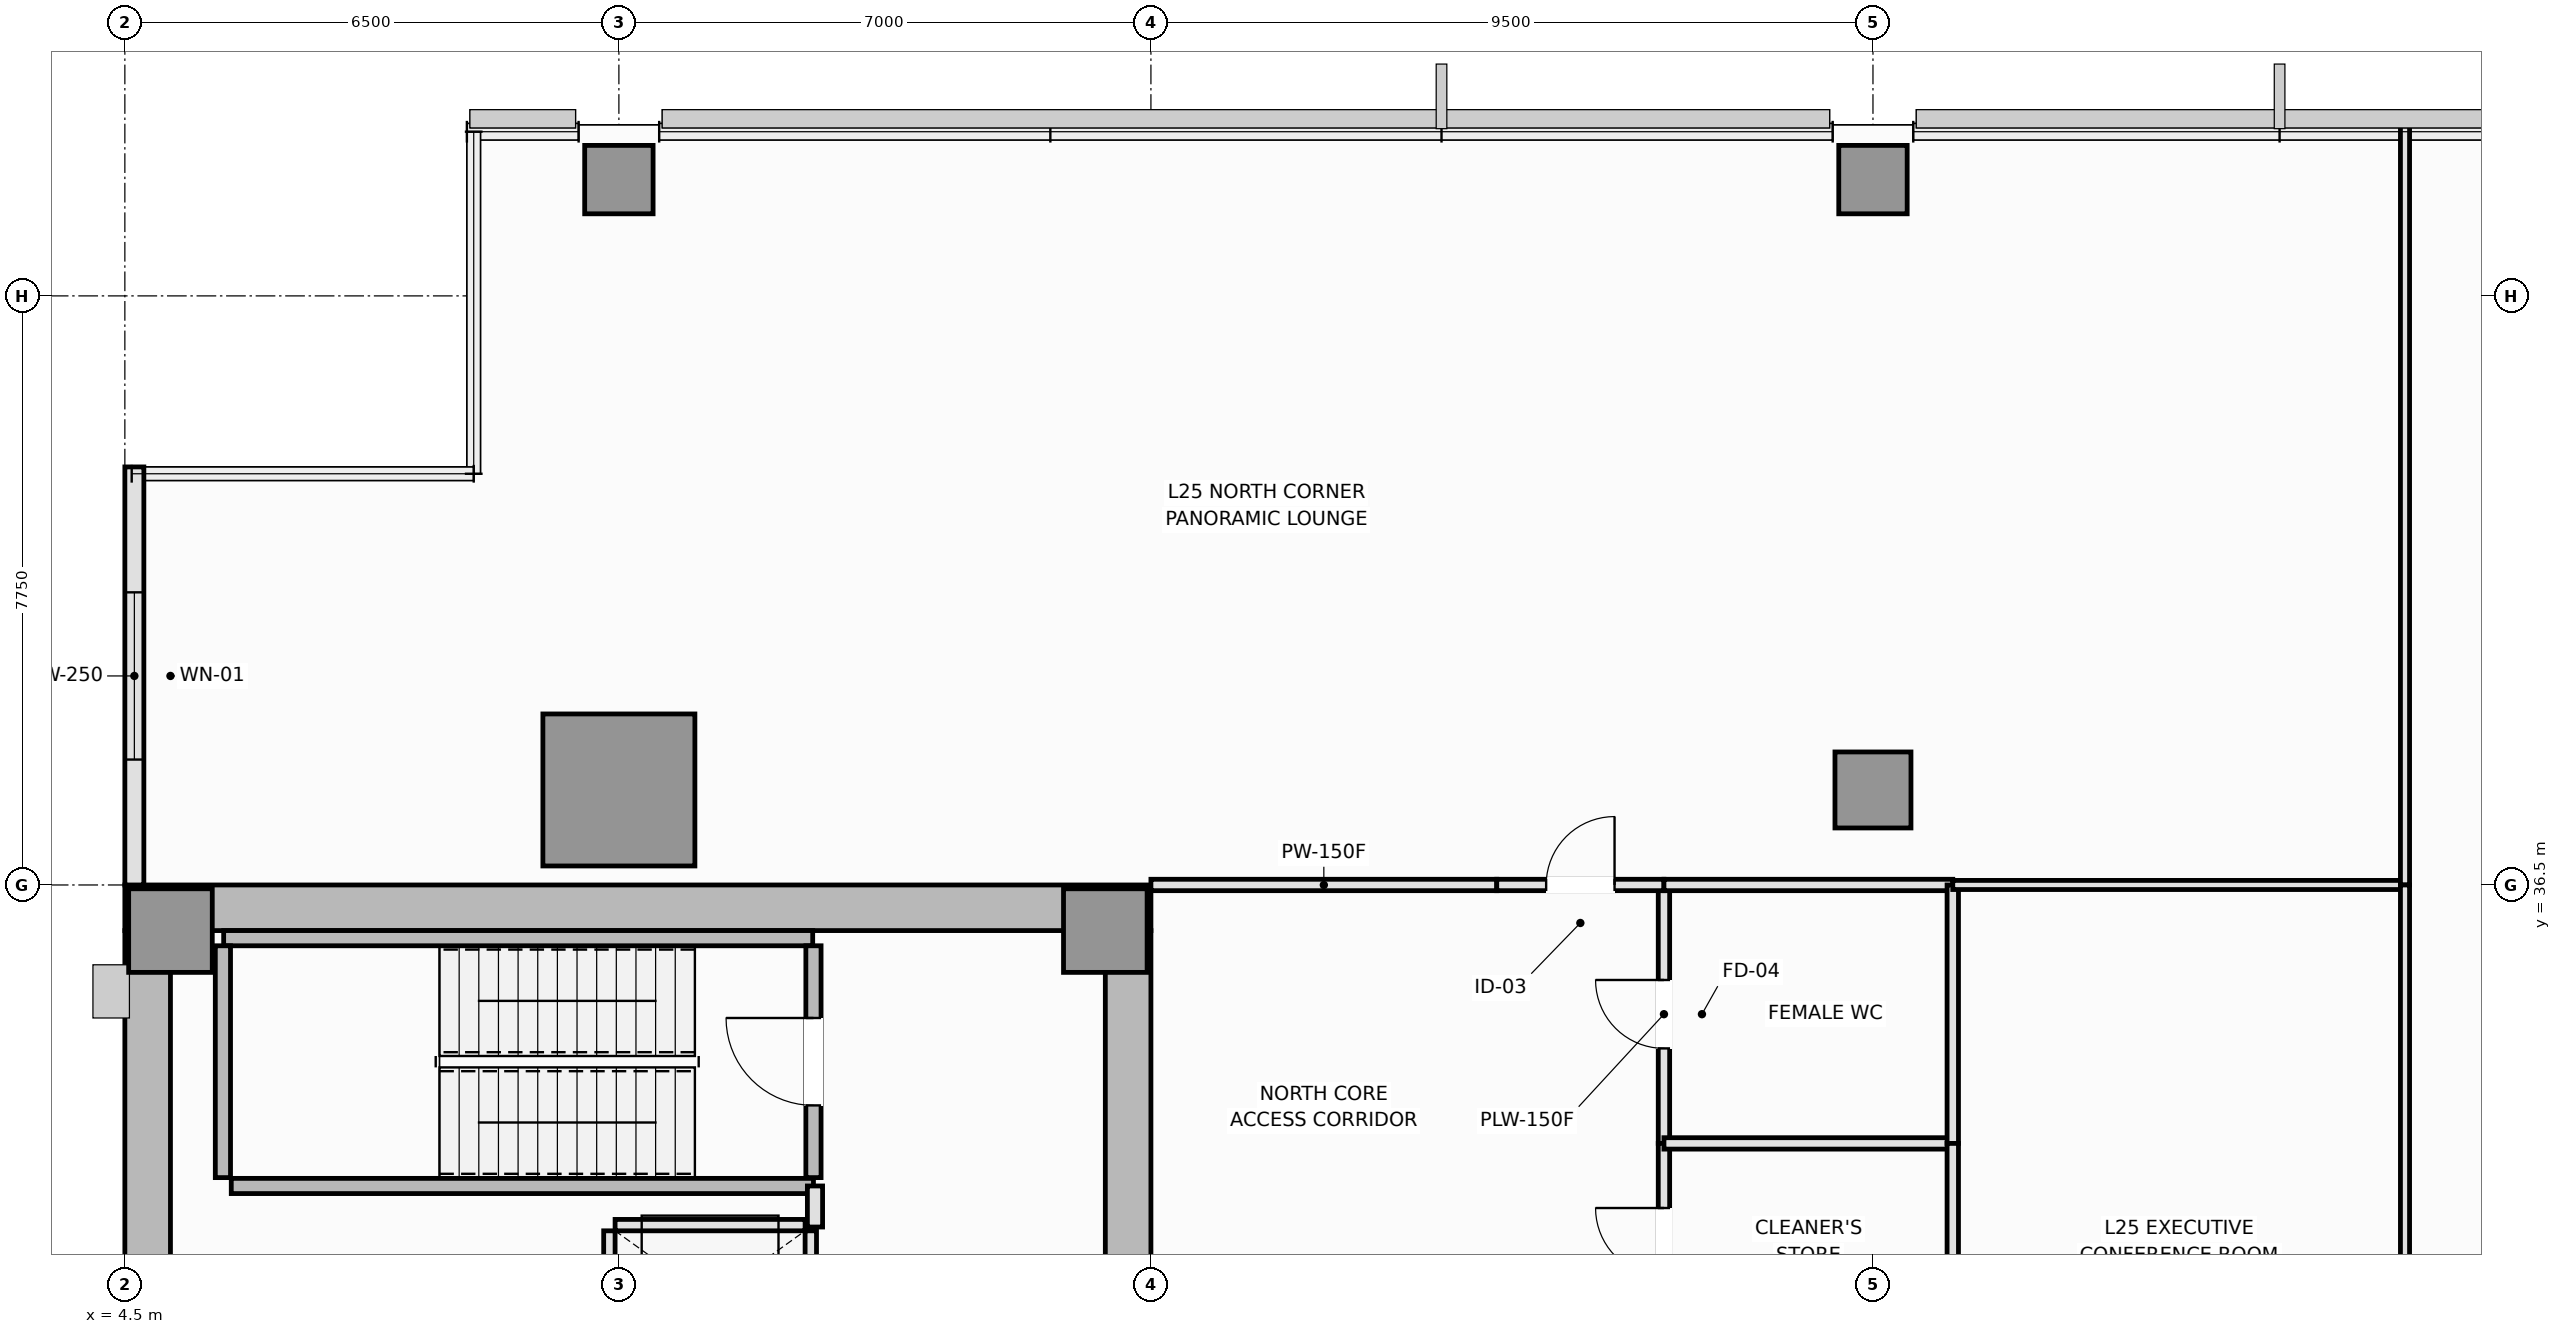
"""IFC4 building model, lengths in metres.
Left out: names, types, materials, properties, quantities, classifications, styles, units other than length and angle.
Written with IfcOpenShell. Run it as: python <this file> out.ifc"""

import sys

from ifc_helpers import new_model, si_unit, direction, frame, frame_2d, origin, origin_2d, place, context, subcontext, project, spatial, rectangle, extrude, element, fill, save


model = new_model("IFC4")
c1 = context("Model", 3, precision=1e-05, world=origin(), true_north=direction((0.0, 1.0)))
c2 = subcontext(c1, "Body", "Model", "MODEL_VIEW")
j1 = project(units=[si_unit("LENGTHUNIT", "METRE"), si_unit("PLANEANGLEUNIT", "RADIAN")], contexts=[c1])
p1 = place(None, origin())
s1 = spatial("IfcSite", under=j1, at=p1, CompositionType="ELEMENT")
p2 = place(p1, origin())
s2 = spatial("IfcBuilding", under=s1, at=p2, CompositionType="ELEMENT")
p3 = place(p2, frame((0.0, 0.0, 97.85)))
s3 = spatial("IfcBuildingStorey", under=s2, at=p3, CompositionType="ELEMENT", Elevation=97.85)
p4 = place(p3, frame((4.5, 36.2, 0.0), z_axis=(0.0, 0.0, 1.0), x_axis=(1.0, 0.0, 0.0)))
e1 = element("IfcWall", 1, at=p4, inside=s3, PredefinedType="SHEAR", context=c2, shape_type="SweptSolid", body=[
    extrude(rectangle(XDim=13.5, YDim=0.6, at=frame_2d((6.75, 0.0))), origin(), (0.0, 0.0, 1.0), 4.4),
])
p5 = place(p3, frame((4.8, 14.6, 0.0), z_axis=(0.0, 0.0, 1.0), x_axis=(0.0, 1.0, 0.0)))
e2 = element("IfcWall", 2, at=p5, inside=s3, PredefinedType="SHEAR", context=c2, shape_type="SweptSolid", body=[
    extrude(rectangle(XDim=21.3, YDim=0.6, at=frame_2d((10.65, 0.0))), origin(), (0.0, 0.0, 1.0), 4.4),
])
p6 = place(p3, frame((17.7, 27.05, 0.0), z_axis=(0.0, 0.0, 1.0), x_axis=(0.0, 1.0, 0.0)))
e3 = element("IfcWall", 3, at=p6, inside=s3, PredefinedType="SHEAR", context=c2, shape_type="SweptSolid", body=[
    extrude(rectangle(XDim=8.85, YDim=0.6, at=frame_2d((4.425, 0.0))), origin(), (0.0, 0.0, 1.0), 4.4),
])
p7 = place(p6, frame((3.45, 0.0, 0.0)))
e4 = element("IfcOpeningElement", 4, at=p7, cuts=e3, PredefinedType="OPENING", context=c2, shape_type="SweptSolid", body=[
    extrude(rectangle(XDim=1.1, YDim=2.15, at=frame_2d((0.55, 1.075))), frame((0.0, 0.31, 0.0), z_axis=(0.0, -1.0, 0.0), x_axis=(1.0, 0.0, 0.0)), (0.0, 0.0, 1.0), 0.62),
])
for number, where, z_axis, x_axis in (
    (5, (5.1, 35.9, 0.0), (0.0, 0.0, 1.0), (1.0, 0.0, 0.0)),
    (6, (17.4, 35.9, 0.0), (0.0, 0.0, 1.0), (1.0, 0.0, 0.0)),
):
    element("IfcColumn", number, at=place(p3, frame(where, z_axis=z_axis, x_axis=x_axis)), inside=s3, PredefinedType="PILASTER", context=c2, shape_type="SweptSolid", body=[
        extrude(rectangle(XDim=1.1, YDim=1.1, at=origin_2d()), origin(), (0.0, 0.0, 1.0), 4.4),
    ])
p8 = place(p3, frame((11.0, 37.75, 0.0), z_axis=(0.0, 0.0, 1.0), x_axis=(1.0, 0.0, 0.0)))
e7 = element("IfcColumn", 7, at=p8, inside=s3, PredefinedType="COLUMN", context=c2, shape_type="SweptSolid", body=[
    extrude(rectangle(XDim=2.0, YDim=2.0, at=origin_2d()), origin(), (0.0, 0.0, 1.0), 4.4),
])
p9 = place(p3, frame((27.5, 37.75, 0.0), z_axis=(0.0, 0.0, 1.0), x_axis=(1.0, 0.0, 0.0)))
e8 = element("IfcColumn", 8, at=p9, inside=s3, PredefinedType="COLUMN", context=c2, shape_type="SweptSolid", body=[
    extrude(rectangle(XDim=1.0, YDim=1.0, at=origin_2d()), origin(), (0.0, 0.0, 1.0), 4.4),
])
for number, where, z_axis, x_axis in (
    (9, (11.0, 45.78, 0.0), (0.0, 0.0, 1.0), (1.0, 0.0, 0.0)),
    (10, (27.5, 45.78, 0.0), (0.0, 0.0, 1.0), (1.0, 0.0, 0.0)),
):
    element("IfcColumn", number, at=place(p3, frame(where, z_axis=z_axis, x_axis=x_axis)), inside=s3, PredefinedType="COLUMN", context=c2, shape_type="SweptSolid", body=[
        extrude(rectangle(XDim=0.9, YDim=0.9, at=origin_2d()), origin(), (0.0, 0.0, 1.0), 4.4),
    ])
p10 = place(p3, frame((4.625, 42.0, 0.0), z_axis=(0.0, 0.0, 1.0), x_axis=(0.0, -1.0, 0.0)))
e11 = element("IfcWall", 11, at=p10, inside=s3, PredefinedType="SOLIDWALL", context=c2, shape_type="SweptSolid", body=[
    extrude(rectangle(XDim=5.5, YDim=0.25, at=frame_2d((2.75, 0.0))), origin(), (0.0, 0.0, 1.0), 4.22),
])
p11 = place(p10, frame((1.65, 0.0, 0.9)))
e12 = element("IfcOpeningElement", 12, at=p11, cuts=e11, PredefinedType="OPENING", context=c2, shape_type="SweptSolid", body=[
    extrude(rectangle(XDim=2.2, YDim=1.8, at=frame_2d((1.1, 0.9))), frame((0.0, 0.135, 0.0), z_axis=(0.0, -1.0, 0.0), x_axis=(1.0, 0.0, 0.0)), (0.0, 0.0, 1.0), 0.27),
])
p12 = place(p3, frame((5.8, 35.8, 0.0), z_axis=(0.0, 0.0, 1.0), x_axis=(1.0, 0.0, 0.0)))
e13 = element("IfcWall", 13, at=p12, inside=s3, PredefinedType="SOLIDWALL", context=c2, shape_type="SweptSolid", body=[
    extrude(rectangle(XDim=7.75, YDim=0.2, at=frame_2d((3.875, 0.0))), origin(), (0.0, 0.0, 1.0), 4.4),
])
p13 = place(p3, frame((5.79, 32.65, 0.0), z_axis=(0.0, 0.0, 1.0), x_axis=(0.0, 1.0, 0.0)))
e14 = element("IfcWall", 14, at=p13, inside=s3, PredefinedType="SOLIDWALL", context=c2, shape_type="SweptSolid", body=[
    extrude(rectangle(XDim=3.05, YDim=0.2, at=frame_2d((1.525, 0.0))), origin(), (0.0, 0.0, 1.0), 4.4),
])
p14 = place(p3, frame((5.9, 32.54, 0.0), z_axis=(0.0, 0.0, 1.0), x_axis=(1.0, 0.0, 0.0)))
e15 = element("IfcWall", 15, at=p14, inside=s3, PredefinedType="SOLIDWALL", context=c2, shape_type="SweptSolid", body=[
    extrude(rectangle(XDim=7.66, YDim=0.2, at=frame_2d((3.83, 0.0))), origin(), (0.0, 0.0, 1.0), 4.4),
])
p15 = place(p3, frame((13.56, 32.65, 0.0), z_axis=(0.0, 0.0, 1.0), x_axis=(0.0, 1.0, 0.0)))
e16 = element("IfcWall", 16, at=p15, inside=s3, PredefinedType="SOLIDWALL", context=c2, shape_type="SweptSolid", body=[
    extrude(rectangle(XDim=3.05, YDim=0.2, at=frame_2d((1.525, 0.0))), origin(), (0.0, 0.0, 1.0), 4.4),
])
p16 = place(p15, frame((0.95, 0.0, 0.0)))
e17 = element("IfcOpeningElement", 17, at=p16, cuts=e16, PredefinedType="OPENING", context=c2, shape_type="SweptSolid", body=[
    extrude(rectangle(XDim=1.15, YDim=2.15, at=frame_2d((0.575, 1.075))), frame((0.0, 0.11, 0.0), z_axis=(0.0, -1.0, 0.0), x_axis=(1.0, 0.0, 0.0)), (0.0, 0.0, 1.0), 0.22),
])
p17 = place(p3, frame((10.95, 32.025, 0.0), z_axis=(0.0, 0.0, 1.0), x_axis=(1.0, 0.0, 0.0)))
e18 = element("IfcWall", 18, at=p17, inside=s3, PredefinedType="PARTITIONING", context=c2, shape_type="SweptSolid", body=[
    extrude(rectangle(XDim=2.5, YDim=0.15, at=frame_2d((1.25, 0.0))), origin(), (0.0, 0.0, 1.0), 4.22),
])
p18 = place(p3, frame((10.875, 30.15, 0.0), z_axis=(0.0, 0.0, 1.0), x_axis=(0.0, 1.0, 0.0)))
e19 = element("IfcWall", 19, at=p18, inside=s3, PredefinedType="PARTITIONING", context=c2, shape_type="SweptSolid", body=[
    extrude(rectangle(XDim=1.8, YDim=0.15, at=frame_2d((0.9, 0.0))), origin(), (0.0, 0.0, 1.0), 4.22),
])
p19 = place(p3, frame((13.525, 30.15, 0.0), z_axis=(0.0, 0.0, 1.0), x_axis=(0.0, 1.0, 0.0)))
e20 = element("IfcWall", 20, at=p19, inside=s3, PredefinedType="PARTITIONING", context=c2, shape_type="SweptSolid", body=[
    extrude(rectangle(XDim=1.8, YDim=0.15, at=frame_2d((0.9, 0.0))), origin(), (0.0, 0.0, 1.0), 4.22),
])
p20 = place(p19, frame((0.35, 0.0, 0.0)))
e21 = element("IfcOpeningElement", 21, at=p20, cuts=e20, PredefinedType="OPENING", context=c2, shape_type="SweptSolid", body=[
    extrude(rectangle(XDim=1.1, YDim=2.2, at=frame_2d((0.55, 1.1))), frame((0.0, 0.085, 0.0), z_axis=(0.0, -1.0, 0.0), x_axis=(1.0, 0.0, 0.0)), (0.0, 0.0, 1.0), 0.17),
])
p21 = place(p3, frame((13.58, 32.0, 0.0), z_axis=(0.0, 0.0, 1.0), x_axis=(0.0, 1.0, 0.0)))
e22 = element("IfcWall", 22, at=p21, inside=s3, PredefinedType="PARTITIONING", context=c2, shape_type="SweptSolid", body=[
    extrude(rectangle(XDim=0.54, YDim=0.2, at=frame_2d((0.27, 0.0))), origin(), (0.0, 0.0, 1.0), 4.22),
])
p22 = place(p3, frame((18.0, 36.5, 0.0), z_axis=(0.0, 0.0, 1.0), x_axis=(1.0, 0.0, 0.0)))
e23 = element("IfcWall", 23, at=p22, inside=s3, PredefinedType="PARTITIONING", context=c2, shape_type="SweptSolid", body=[
    extrude(rectangle(XDim=4.55, YDim=0.15, at=frame_2d((2.275, 0.0))), origin(), (0.0, 0.0, 1.0), 4.22),
])
p23 = place(p3, frame((24.75, 33.1, 0.0), z_axis=(0.0, 0.0, 1.0), x_axis=(0.0, 1.0, 0.0)))
e24 = element("IfcWall", 24, at=p23, inside=s3, PredefinedType="PLUMBINGWALL", context=c2, shape_type="SweptSolid", body=[
    extrude(rectangle(XDim=3.4, YDim=0.15, at=frame_2d((1.7, 0.0))), origin(), (0.0, 0.0, 1.0), 4.22),
])
p24 = place(p23, frame((1.25, 0.0, 0.0)))
e25 = element("IfcOpeningElement", 25, at=p24, cuts=e24, PredefinedType="OPENING", context=c2, shape_type="SweptSolid", body=[
    extrude(rectangle(XDim=0.9, YDim=2.1, at=frame_2d((0.45, 1.05))), frame((0.0, 0.085, 0.0), z_axis=(0.0, -1.0, 0.0), x_axis=(1.0, 0.0, 0.0)), (0.0, 0.0, 1.0), 0.17),
])
p25 = place(p3, frame((24.75, 30.5, 0.0), z_axis=(0.0, 0.0, 1.0), x_axis=(0.0, 1.0, 0.0)))
e26 = element("IfcWall", 26, at=p25, inside=s3, PredefinedType="PLUMBINGWALL", context=c2, shape_type="SweptSolid", body=[
    extrude(rectangle(XDim=2.6, YDim=0.15, at=frame_2d((1.3, 0.0))), origin(), (0.0, 0.0, 1.0), 4.22),
])
p26 = place(p25, frame((0.85, 0.0, 0.0)))
e27 = element("IfcOpeningElement", 27, at=p26, cuts=e26, PredefinedType="OPENING", context=c2, shape_type="SweptSolid", body=[
    extrude(rectangle(XDim=0.9, YDim=2.1, at=frame_2d((0.45, 1.05))), frame((0.0, 0.085, 0.0), z_axis=(0.0, -1.0, 0.0), x_axis=(1.0, 0.0, 0.0)), (0.0, 0.0, 1.0), 0.17),
])
p27 = place(p3, frame((22.55, 36.5, 0.0), z_axis=(0.0, 0.0, 1.0), x_axis=(1.0, 0.0, 0.0)))
e28 = element("IfcWall", 28, at=p27, inside=s3, PredefinedType="PARTITIONING", context=c2, shape_type="SweptSolid", body=[
    extrude(rectangle(XDim=2.2, YDim=0.15, at=frame_2d((1.1, 0.0))), origin(), (0.0, 0.0, 1.0), 4.22),
])
p28 = place(p27, frame((0.65, 0.0, 0.0)))
e29 = element("IfcOpeningElement", 29, at=p28, cuts=e28, PredefinedType="OPENING", context=c2, shape_type="SweptSolid", body=[
    extrude(rectangle(XDim=0.9, YDim=2.1, at=frame_2d((0.45, 1.05))), frame((0.0, 0.085, 0.0), z_axis=(0.0, -1.0, 0.0), x_axis=(1.0, 0.0, 0.0)), (0.0, 0.0, 1.0), 0.17),
])
for number, where, z_axis, x_axis in (
    (30, (24.75, 33.1, 0.0), (0.0, 0.0, 1.0), (1.0, 0.0, 0.0)),
    (31, (24.75, 36.5, 0.0), (0.0, 0.0, 1.0), (1.0, 0.0, 0.0)),
):
    element("IfcWall", number, at=place(p3, frame(where, z_axis=z_axis, x_axis=x_axis)), inside=s3, PredefinedType="PLUMBINGWALL", context=c2, shape_type="SweptSolid", body=[
        extrude(rectangle(XDim=3.8, YDim=0.15, at=frame_2d((1.9, 0.0))), origin(), (0.0, 0.0, 1.0), 4.22),
    ])
p29 = place(p3, frame((28.55, 33.1, 0.0), z_axis=(0.0, 0.0, 1.0), x_axis=(0.0, 1.0, 0.0)))
e32 = element("IfcWall", 32, at=p29, inside=s3, PredefinedType="PLUMBINGWALL", context=c2, shape_type="SweptSolid", body=[
    extrude(rectangle(XDim=3.4, YDim=0.15, at=frame_2d((1.7, 0.0))), origin(), (0.0, 0.0, 1.0), 4.22),
])
p30 = place(p3, frame((28.55, 30.5, 0.0), z_axis=(0.0, 0.0, 1.0), x_axis=(0.0, 1.0, 0.0)))
e33 = element("IfcWall", 33, at=p30, inside=s3, PredefinedType="PLUMBINGWALL", context=c2, shape_type="SweptSolid", body=[
    extrude(rectangle(XDim=2.6, YDim=0.15, at=frame_2d((1.3, 0.0))), origin(), (0.0, 0.0, 1.0), 4.22),
])
p31 = place(p3, frame((28.55, 36.5, 0.0), z_axis=(0.0, 0.0, 1.0), x_axis=(1.0, 0.0, 0.0)))
e34 = element("IfcWall", 34, at=p31, inside=s3, PredefinedType="PARTITIONING", context=c2, shape_type="SweptSolid", body=[
    extrude(rectangle(XDim=5.95, YDim=0.12, at=frame_2d((2.975, 0.0))), origin(), (0.0, 0.0, 1.0), 4.22),
])
p32 = place(p3, frame((34.5, 36.5, 0.0), z_axis=(0.0, 0.0, 1.0), x_axis=(0.0, 1.0, 0.0)))
e35 = element("IfcWall", 35, at=p32, inside=s3, PredefinedType="PARTITIONING", context=c2, shape_type="SweptSolid", body=[
    extrude(rectangle(XDim=9.99, YDim=0.12, at=frame_2d((4.995, 0.0))), origin(), (0.0, 0.0, 1.0), 3.82),
])
p33 = place(p3, frame((34.5, 26.7, 0.0), z_axis=(0.0, 0.0, 1.0), x_axis=(0.0, 1.0, 0.0)))
e36 = element("IfcWall", 36, at=p33, inside=s3, PredefinedType="PARTITIONING", context=c2, shape_type="SweptSolid", body=[
    extrude(rectangle(XDim=9.8, YDim=0.12, at=frame_2d((4.9, 0.0))), origin(), (0.0, 0.0, 1.0), 4.22),
])
p34 = place(p11, origin())
e37 = element("IfcWindow", 37, at=p34, inside=s3, PartitioningType="SINGLE_PANEL", PredefinedType="WINDOW", context=c2, shape_type="SweptSolid", body=[
    extrude(rectangle(XDim=2.2, YDim=1.8, at=frame_2d((1.1, 0.9))), frame((0.0, 0.03, 0.0), z_axis=(0.0, -1.0, 0.0), x_axis=(1.0, 0.0, 0.0)), (0.0, 0.0, 1.0), 0.06),
])
fill(e12, e37)
p35 = place(p16, origin())
e38 = element("IfcDoor", 38, at=p35, inside=s3, OperationType="SINGLE_SWING_RIGHT", PredefinedType="DOOR", context=c2, shape_type="SweptSolid", body=[
    extrude(rectangle(XDim=1.15, YDim=2.15, at=frame_2d((0.575, 1.075))), frame((0.0, 0.025, 0.0), z_axis=(0.0, -1.0, 0.0), x_axis=(1.0, 0.0, 0.0)), (0.0, 0.0, 1.0), 0.05),
])
fill(e17, e38)
p36 = place(p24, origin())
e39 = element("IfcDoor", 39, at=p36, inside=s3, OperationType="SINGLE_SWING_RIGHT", PredefinedType="DOOR", context=c2, shape_type="SweptSolid", body=[
    extrude(rectangle(XDim=0.9, YDim=2.1, at=frame_2d((0.45, 1.05))), frame((0.0, 0.025, 0.0), z_axis=(0.0, -1.0, 0.0), x_axis=(1.0, 0.0, 0.0)), (0.0, 0.0, 1.0), 0.05),
])
fill(e25, e39)
p37 = place(p26, origin())
e40 = element("IfcDoor", 40, at=p37, inside=s3, OperationType="SINGLE_SWING_RIGHT", PredefinedType="DOOR", context=c2, shape_type="SweptSolid", body=[
    extrude(rectangle(XDim=0.9, YDim=2.1, at=frame_2d((0.45, 1.05))), frame((0.0, 0.025, 0.0), z_axis=(0.0, -1.0, 0.0), x_axis=(1.0, 0.0, 0.0)), (0.0, 0.0, 1.0), 0.05),
])
fill(e27, e40)
p38 = place(p28, origin())
e41 = element("IfcDoor", 41, at=p38, inside=s3, OperationType="SINGLE_SWING_RIGHT", PredefinedType="DOOR", context=c2, shape_type="SweptSolid", body=[
    extrude(rectangle(XDim=0.9, YDim=2.1, at=frame_2d((0.45, 1.05))), frame((0.0, 0.025, 0.0), z_axis=(0.0, -1.0, 0.0), x_axis=(1.0, 0.0, 0.0)), (0.0, 0.0, 1.0), 0.05),
])
fill(e29, e41)
save(model, sys.argv[1])
